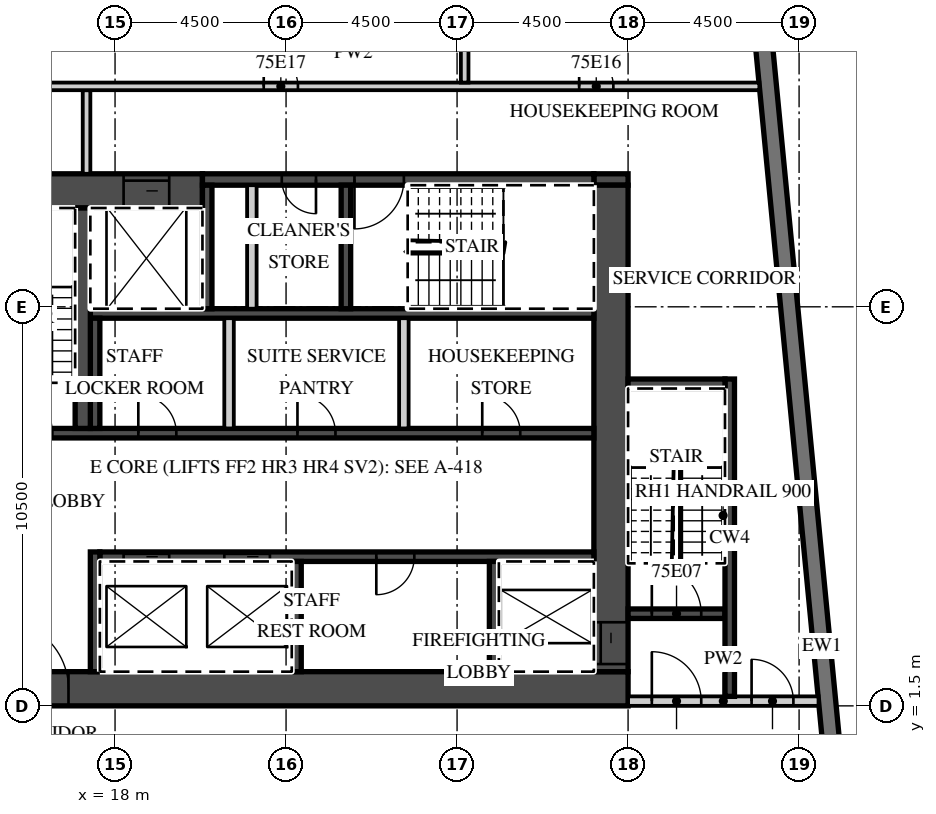
"""IFC4 building model, lengths in metres.
Left out: names, types, materials, properties, quantities, classifications, styles, units other than length and angle.
Written with IfcOpenShell. Run it as: python <this file> out.ifc"""

import sys

from ifc_helpers import new_model, si_unit, direction, frame, frame_2d, origin, place, context, subcontext, project, spatial, rectangle, extrude, element, fill, save


model = new_model("IFC4")
c1 = context("Model", 3, precision=1e-05, world=origin(), true_north=direction((0.0, 1.0)))
c2 = subcontext(c1, "Body", "Model", "MODEL_VIEW")
j1 = project(units=[si_unit("LENGTHUNIT", "METRE"), si_unit("PLANEANGLEUNIT", "RADIAN")], contexts=[c1])
p1 = place(None, origin())
s1 = spatial("IfcSite", under=j1, at=p1, CompositionType="ELEMENT")
p2 = place(p1, origin())
s2 = spatial("IfcBuilding", under=s1, at=p2, CompositionType="ELEMENT")
p3 = place(p2, frame((0.0, 0.0, 298.2)))
s3 = spatial("IfcBuildingStorey", under=s2, at=p3, CompositionType="ELEMENT", Elevation=298.2)
p4 = place(p3, frame((38.132, -12.858, 0.0), z_axis=(0.0, 0.0, 1.0), x_axis=(-0.095847749461, 0.995396006082, 0.0)))
e1 = element("IfcWall", 1, at=p4, inside=s3, PredefinedType="SOLIDWALL", context=c2, shape_type="SweptSolid", body=[
    extrude(rectangle(XDim=32.0, YDim=0.45, at=frame_2d((16.0, 0.0))), origin(), (0.0, 0.0, 1.0), 3.02),
])
p5 = place(p3, frame((13.5, 1.95, 0.0), z_axis=(0.0, 0.0, 1.0), x_axis=(1.0, 0.0, 0.0)))
e2 = element("IfcWall", 2, at=p5, inside=s3, PredefinedType="SHEAR", context=c2, shape_type="SweptSolid", body=[
    extrude(rectangle(XDim=18.0, YDim=0.9, at=frame_2d((9.0, 0.0))), origin(), (0.0, 0.0, 1.0), 3.02),
])
p6 = place(p5, frame((1.475, 0.0, 0.0)))
e3 = element("IfcOpeningElement", 3, at=p6, cuts=e2, PredefinedType="OPENING", context=c2, shape_type="SweptSolid", body=[
    extrude(rectangle(XDim=1.8, YDim=2.1, at=frame_2d((0.9, 1.05))), frame((0.0, 0.46, 0.0), z_axis=(0.0, -1.0, 0.0), x_axis=(1.0, 0.0, 0.0)), (0.0, 0.0, 1.0), 0.92),
])
p7 = place(p3, frame((13.5, 15.05, 0.0), z_axis=(0.0, 0.0, 1.0), x_axis=(1.0, 0.0, 0.0)))
e4 = element("IfcWall", 4, at=p7, inside=s3, PredefinedType="SHEAR", context=c2, shape_type="SweptSolid", body=[
    extrude(rectangle(XDim=6.8, YDim=0.9, at=frame_2d((3.4, 0.0))), origin(), (0.0, 0.0, 1.0), 3.02),
])
p8 = place(p7, frame((4.725, 0.0, 0.0)))
e5 = element("IfcOpeningElement", 5, at=p8, cuts=e4, PredefinedType="OPENING", context=c2, shape_type="SweptSolid", body=[
    extrude(rectangle(XDim=1.2, YDim=2.1, at=frame_2d((0.6, 1.05))), frame((0.0, 0.46, 0.0), z_axis=(0.0, -1.0, 0.0), x_axis=(1.0, 0.0, 0.0)), (0.0, 0.0, 1.0), 0.92),
])
p9 = place(p3, frame((30.6, 15.35, 0.0), z_axis=(0.0, 0.0, 1.0), x_axis=(1.0, 0.0, 0.0)))
e6 = element("IfcWall", 6, at=p9, inside=s3, PredefinedType="SHEAR", context=c2, shape_type="SweptSolid", body=[
    extrude(rectangle(XDim=0.9, YDim=0.3, at=frame_2d((0.45, 0.0))), origin(), (0.0, 0.0, 1.0), 3.02),
])
p10 = place(p3, frame((20.3, 15.35, 0.0), z_axis=(0.0, 0.0, 1.0), x_axis=(1.0, 0.0, 0.0)))
e7 = element("IfcWall", 7, at=p10, inside=s3, PredefinedType="SHEAR", context=c2, shape_type="SweptSolid", body=[
    extrude(rectangle(XDim=10.3, YDim=0.3, at=frame_2d((5.15, 0.0))), origin(), (0.0, 0.0, 1.0), 3.02),
])
p11 = place(p10, frame((4.0, 0.0, 0.0)))
e8 = element("IfcOpeningElement", 8, at=p11, cuts=e7, PredefinedType="OPENING", context=c2, shape_type="SweptSolid", body=[
    extrude(rectangle(XDim=1.3, YDim=2.1, at=frame_2d((0.65, 1.05))), frame((0.0, 0.16, 0.0), z_axis=(0.0, -1.0, 0.0), x_axis=(1.0, 0.0, 0.0)), (0.0, 0.0, 1.0), 0.32),
])
p12 = place(p10, frame((2.087, 0.0, 0.0)))
e9 = element("IfcOpeningElement", 9, at=p12, cuts=e7, PredefinedType="OPENING", context=c2, shape_type="SweptSolid", body=[
    extrude(rectangle(XDim=0.9, YDim=2.1, at=frame_2d((0.45, 1.05))), frame((0.0, 0.16, 0.0), z_axis=(0.0, -1.0, 0.0), x_axis=(1.0, 0.0, 0.0)), (0.0, 0.0, 1.0), 0.32),
])
p13 = place(p3, frame((31.05, 2.4, 0.0), z_axis=(0.0, 0.0, 1.0), x_axis=(0.0, 1.0, 0.0)))
e10 = element("IfcWall", 10, at=p13, inside=s3, PredefinedType="SHEAR", context=c2, shape_type="SweptSolid", body=[
    extrude(rectangle(XDim=12.8, YDim=0.9, at=frame_2d((6.4, 0.0))), origin(), (0.0, 0.0, 1.0), 3.02),
])
p14 = place(p13, frame((0.2, 0.0, 0.0)))
e11 = element("IfcOpeningElement", 11, at=p14, cuts=e10, PredefinedType="OPENING", context=c2, shape_type="SweptSolid", body=[
    extrude(rectangle(XDim=1.1, YDim=2.1, at=frame_2d((0.55, 1.05))), frame((0.0, 0.46, 0.0), z_axis=(0.0, -1.0, 0.0), x_axis=(1.0, 0.0, 0.0)), (0.0, 0.0, 1.0), 0.92),
])
p15 = place(p3, frame((17.6, 5.425, 0.0), z_axis=(0.0, 0.0, 1.0), x_axis=(1.0, 0.0, 0.0)))
e12 = element("IfcWall", 12, at=p15, inside=s3, PredefinedType="SHEAR", context=c2, shape_type="SweptSolid", body=[
    extrude(rectangle(XDim=13.0, YDim=0.25, at=frame_2d((6.5, 0.0))), origin(), (0.0, 0.0, 1.0), 3.02),
])
p16 = place(p15, frame((3.275, 0.0, 0.0)))
e13 = element("IfcOpeningElement", 13, at=p16, cuts=e12, PredefinedType="OPENING", context=c2, shape_type="SweptSolid", body=[
    extrude(rectangle(XDim=1.2, YDim=2.1, at=frame_2d((0.6, 1.05))), frame((0.0, 0.135, 0.0), z_axis=(0.0, -1.0, 0.0), x_axis=(1.0, 0.0, 0.0)), (0.0, 0.0, 1.0), 0.27),
])
p17 = place(p15, frame((0.625, 0.0, 0.0)))
e14 = element("IfcOpeningElement", 14, at=p17, cuts=e12, PredefinedType="OPENING", context=c2, shape_type="SweptSolid", body=[
    extrude(rectangle(XDim=1.2, YDim=2.1, at=frame_2d((0.6, 1.05))), frame((0.0, 0.135, 0.0), z_axis=(0.0, -1.0, 0.0), x_axis=(1.0, 0.0, 0.0)), (0.0, 0.0, 1.0), 0.27),
])
p18 = place(p15, frame((7.275, 0.0, 0.0)))
e15 = element("IfcOpeningElement", 15, at=p18, cuts=e12, PredefinedType="OPENING", context=c2, shape_type="SweptSolid", body=[
    extrude(rectangle(XDim=1.0, YDim=2.1, at=frame_2d((0.5, 1.05))), frame((0.0, 0.135, 0.0), z_axis=(0.0, -1.0, 0.0), x_axis=(1.0, 0.0, 0.0)), (0.0, 0.0, 1.0), 0.27),
])
p19 = place(p3, frame((17.475, 2.4, 0.0), z_axis=(0.0, 0.0, 1.0), x_axis=(0.0, 1.0, 0.0)))
e16 = element("IfcWall", 16, at=p19, inside=s3, PredefinedType="SHEAR", context=c2, shape_type="SweptSolid", body=[
    extrude(rectangle(XDim=3.15, YDim=0.25, at=frame_2d((1.575, 0.0))), origin(), (0.0, 0.0, 1.0), 3.02),
])
for number, where, z_axis, x_axis in (
    (17, (27.975, 2.4, 0.0), (0.0, 0.0, 1.0), (0.0, 1.0, 0.0)),
    (18, (22.775, 2.4, 0.0), (0.0, 0.0, 1.0), (0.0, 1.0, 0.0)),
):
    element("IfcWall", number, at=place(p3, frame(where, z_axis=z_axis, x_axis=x_axis)), inside=s3, PredefinedType="SHEAR", context=c2, shape_type="SweptSolid", body=[
        extrude(rectangle(XDim=2.9, YDim=0.25, at=frame_2d((1.45, 0.0))), origin(), (0.0, 0.0, 1.0), 3.02),
    ])
p20 = place(p3, frame((14.4, 8.675, 0.0), z_axis=(0.0, 0.0, 1.0), x_axis=(1.0, 0.0, 0.0)))
e19 = element("IfcWall", 19, at=p20, inside=s3, PredefinedType="SHEAR", context=c2, shape_type="SweptSolid", body=[
    extrude(rectangle(XDim=16.2, YDim=0.25, at=frame_2d((8.1, 0.0))), origin(), (0.0, 0.0, 1.0), 3.02),
])
p21 = place(p20, frame((0.65, 0.0, 0.0)))
e20 = element("IfcOpeningElement", 20, at=p21, cuts=e19, PredefinedType="OPENING", context=c2, shape_type="SweptSolid", body=[
    extrude(rectangle(XDim=1.3, YDim=2.1, at=frame_2d((0.65, 1.05))), frame((0.0, 0.135, 0.0), z_axis=(0.0, -1.0, 0.0), x_axis=(1.0, 0.0, 0.0)), (0.0, 0.0, 1.0), 0.27),
])
p22 = place(p20, frame((13.262, 0.0, 0.0)))
e21 = element("IfcOpeningElement", 21, at=p22, cuts=e19, PredefinedType="OPENING", context=c2, shape_type="SweptSolid", body=[
    extrude(rectangle(XDim=1.0, YDim=2.1, at=frame_2d((0.5, 1.05))), frame((0.0, 0.135, 0.0), z_axis=(0.0, -1.0, 0.0), x_axis=(1.0, 0.0, 0.0)), (0.0, 0.0, 1.0), 0.27),
])
p23 = place(p20, frame((8.4, 0.0, 0.0)))
e22 = element("IfcOpeningElement", 22, at=p23, cuts=e19, PredefinedType="OPENING", context=c2, shape_type="SweptSolid", body=[
    extrude(rectangle(XDim=1.0, YDim=2.1, at=frame_2d((0.5, 1.05))), frame((0.0, 0.135, 0.0), z_axis=(0.0, -1.0, 0.0), x_axis=(1.0, 0.0, 0.0)), (0.0, 0.0, 1.0), 0.27),
])
p24 = place(p20, frame((4.212, 0.0, 0.0)))
e23 = element("IfcOpeningElement", 23, at=p24, cuts=e19, PredefinedType="OPENING", context=c2, shape_type="SweptSolid", body=[
    extrude(rectangle(XDim=1.0, YDim=2.1, at=frame_2d((0.5, 1.05))), frame((0.0, 0.135, 0.0), z_axis=(0.0, -1.0, 0.0), x_axis=(1.0, 0.0, 0.0)), (0.0, 0.0, 1.0), 0.27),
])
p25 = place(p3, frame((17.35, 11.825, 0.0), z_axis=(0.0, 0.0, 1.0), x_axis=(1.0, 0.0, 0.0)))
e24 = element("IfcWall", 24, at=p25, inside=s3, PredefinedType="SHEAR", context=c2, shape_type="SweptSolid", body=[
    extrude(rectangle(XDim=13.25, YDim=0.25, at=frame_2d((6.625, 0.0))), origin(), (0.0, 0.0, 1.0), 3.02),
])
p26 = place(p3, frame((17.475, 8.8, 0.0), z_axis=(0.0, 0.0, 1.0), x_axis=(0.0, 1.0, 0.0)))
e25 = element("IfcWall", 25, at=p26, inside=s3, PredefinedType="SHEAR", context=c2, shape_type="SweptSolid", body=[
    extrude(rectangle(XDim=2.9, YDim=0.25, at=frame_2d((1.45, 0.0))), origin(), (0.0, 0.0, 1.0), 3.02),
])
for number, where, z_axis, x_axis in (
    (26, (25.6, 8.8, 0.0), (0.0, 0.0, 1.0), (0.0, 1.0, 0.0)),
    (27, (21.0, 8.8, 0.0), (0.0, 0.0, 1.0), (0.0, 1.0, 0.0)),
):
    element("IfcWall", number, at=place(p3, frame(where, z_axis=z_axis, x_axis=x_axis)), inside=s3, PredefinedType="PARTITIONING", context=c2, shape_type="SweptSolid", body=[
        extrude(rectangle(XDim=2.9, YDim=0.25, at=frame_2d((1.45, 0.0))), origin(), (0.0, 0.0, 1.0), 3.02),
    ])
p27 = place(p3, frame((17.15, 8.8, 0.0), z_axis=(0.0, 0.0, 1.0), x_axis=(0.0, 1.0, 0.0)))
e28 = element("IfcWall", 28, at=p27, inside=s3, PredefinedType="SHEAR", context=c2, shape_type="SweptSolid", body=[
    extrude(rectangle(XDim=5.8, YDim=0.4, at=frame_2d((2.9, 0.0))), origin(), (0.0, 0.0, 1.0), 3.02),
])
for number, where, z_axis, x_axis in (
    (29, (20.425, 11.95, 0.0), (0.0, 0.0, 1.0), (0.0, 1.0, 0.0)),
    (30, (24.075, 11.95, 0.0), (0.0, 0.0, 1.0), (0.0, 1.0, 0.0)),
):
    element("IfcWall", number, at=place(p3, frame(where, z_axis=z_axis, x_axis=x_axis)), inside=s3, PredefinedType="SHEAR", context=c2, shape_type="SweptSolid", body=[
        extrude(rectangle(XDim=3.25, YDim=0.25, at=frame_2d((1.625, 0.0))), origin(), (0.0, 0.0, 1.0), 3.02),
    ])
p28 = place(p3, frame((21.6, 11.95, 0.0), z_axis=(0.0, 0.0, 1.0), x_axis=(0.0, 1.0, 0.0)))
e31 = element("IfcWall", 31, at=p28, inside=s3, PredefinedType="PARTITIONING", context=c2, shape_type="SweptSolid", body=[
    extrude(rectangle(XDim=3.25, YDim=0.25, at=frame_2d((1.625, 0.0))), origin(), (0.0, 0.0, 1.0), 3.02),
])
p29 = place(p3, frame((31.5, 1.625, 0.0), z_axis=(0.0, 0.0, 1.0), x_axis=(1.0, 0.0, 0.0)))
e32 = element("IfcWall", 32, at=p29, inside=s3, PredefinedType="PARTITIONING", context=c2, shape_type="SweptSolid", body=[
    extrude(rectangle(XDim=5.012, YDim=0.25, at=frame_2d((2.506, 0.0))), origin(), (0.0, 0.0, 1.0), 3.02),
])
p30 = place(p29, frame((0.625, 0.0, 0.0)))
e33 = element("IfcOpeningElement", 33, at=p30, cuts=e32, PredefinedType="OPENING", context=c2, shape_type="SweptSolid", body=[
    extrude(rectangle(XDim=1.3, YDim=2.1, at=frame_2d((0.65, 1.05))), frame((0.0, 0.135, 0.0), z_axis=(0.0, -1.0, 0.0), x_axis=(1.0, 0.0, 0.0)), (0.0, 0.0, 1.0), 0.27),
])
p31 = place(p29, frame((3.25, 0.0, 0.0)))
e34 = element("IfcOpeningElement", 34, at=p31, cuts=e32, PredefinedType="OPENING", context=c2, shape_type="SweptSolid", body=[
    extrude(rectangle(XDim=1.1, YDim=2.1, at=frame_2d((0.55, 1.05))), frame((0.0, 0.135, 0.0), z_axis=(0.0, -1.0, 0.0), x_axis=(1.0, 0.0, 0.0)), (0.0, 0.0, 1.0), 0.27),
])
p32 = place(p3, frame((31.5, 3.925, 0.0), z_axis=(0.0, 0.0, 1.0), x_axis=(1.0, 0.0, 0.0)))
e35 = element("IfcWall", 35, at=p32, inside=s3, PredefinedType="SHEAR", context=c2, shape_type="SweptSolid", body=[
    extrude(rectangle(XDim=2.55, YDim=0.25, at=frame_2d((1.275, 0.0))), origin(), (0.0, 0.0, 1.0), 3.02),
])
p33 = place(p32, frame((0.625, 0.0, 0.0)))
e36 = element("IfcOpeningElement", 36, at=p33, cuts=e35, PredefinedType="OPENING", context=c2, shape_type="SweptSolid", body=[
    extrude(rectangle(XDim=1.3, YDim=2.1, at=frame_2d((0.65, 1.05))), frame((0.0, 0.135, 0.0), z_axis=(0.0, -1.0, 0.0), x_axis=(1.0, 0.0, 0.0)), (0.0, 0.0, 1.0), 0.27),
])
p34 = place(p3, frame((34.175, 1.75, 0.0), z_axis=(0.0, 0.0, 1.0), x_axis=(0.0, 1.0, 0.0)))
e37 = element("IfcWall", 37, at=p34, inside=s3, PredefinedType="SHEAR", context=c2, shape_type="SweptSolid", body=[
    extrude(rectangle(XDim=8.35, YDim=0.25, at=frame_2d((4.175, 0.0))), origin(), (0.0, 0.0, 1.0), 3.02),
])
p35 = place(p3, frame((31.5, 9.975, 0.0), z_axis=(0.0, 0.0, 1.0), x_axis=(1.0, 0.0, 0.0)))
e38 = element("IfcWall", 38, at=p35, inside=s3, PredefinedType="SHEAR", context=c2, shape_type="SweptSolid", body=[
    extrude(rectangle(XDim=2.55, YDim=0.25, at=frame_2d((1.275, 0.0))), origin(), (0.0, 0.0, 1.0), 3.02),
])
p36 = place(p3, frame((17.25, 15.5, 0.0), z_axis=(0.0, 0.0, 1.0), x_axis=(0.0, 1.0, 0.0)))
e39 = element("IfcWall", 39, at=p36, inside=s3, PredefinedType="PARTITIONING", context=c2, shape_type="SweptSolid", body=[
    extrude(rectangle(XDim=2.2, YDim=0.2, at=frame_2d((1.1, 0.0))), origin(), (0.0, 0.0, 1.0), 3.02),
])
p37 = place(p3, frame((13.6, 17.8, 0.0), z_axis=(0.0, 0.0, 1.0), x_axis=(1.0, 0.0, 0.0)))
e40 = element("IfcWall", 40, at=p37, inside=s3, PredefinedType="PARTITIONING", context=c2, shape_type="SweptSolid", body=[
    extrude(rectangle(XDim=21.354, YDim=0.2, at=frame_2d((10.677, 0.0))), origin(), (0.0, 0.0, 1.0), 3.02),
])
p38 = place(p37, frame((16.613, 0.0, 0.0)))
e41 = element("IfcOpeningElement", 41, at=p38, cuts=e40, PredefinedType="OPENING", context=c2, shape_type="SweptSolid", body=[
    extrude(rectangle(XDim=0.9, YDim=2.1, at=frame_2d((0.45, 1.05))), frame((0.0, 0.11, 0.0), z_axis=(0.0, -1.0, 0.0), x_axis=(1.0, 0.0, 0.0)), (0.0, 0.0, 1.0), 0.22),
])
p39 = place(p37, frame((8.312, 0.0, 0.0)))
e42 = element("IfcOpeningElement", 42, at=p39, cuts=e40, PredefinedType="OPENING", context=c2, shape_type="SweptSolid", body=[
    extrude(rectangle(XDim=0.9, YDim=2.1, at=frame_2d((0.45, 1.05))), frame((0.0, 0.11, 0.0), z_axis=(0.0, -1.0, 0.0), x_axis=(1.0, 0.0, 0.0)), (0.0, 0.0, 1.0), 0.22),
])
p40 = place(p3, frame((27.2, 17.9, 0.0), z_axis=(0.0, 0.0, 1.0), x_axis=(0.0, 1.0, 0.0)))
e43 = element("IfcWall", 43, at=p40, inside=s3, PredefinedType="PARTITIONING", context=c2, shape_type="SweptSolid", body=[
    extrude(rectangle(XDim=3.905, YDim=0.2, at=frame_2d((1.953, 0.0))), origin(), (0.0, 0.0, 1.0), 3.02),
])
p41 = place(p16, origin())
e44 = element("IfcDoor", 44, at=p41, inside=s3, OperationType="SLIDING_TO_RIGHT", PredefinedType="DOOR", context=c2, shape_type="SweptSolid", body=[
    extrude(rectangle(XDim=1.2, YDim=2.1, at=frame_2d((0.6, 1.05))), frame((0.0, 0.025, 0.0), z_axis=(0.0, -1.0, 0.0), x_axis=(1.0, 0.0, 0.0)), (0.0, 0.0, 1.0), 0.05),
])
fill(e13, e44)
p42 = place(p17, origin())
e45 = element("IfcDoor", 45, at=p42, inside=s3, OperationType="SLIDING_TO_LEFT", PredefinedType="DOOR", context=c2, shape_type="SweptSolid", body=[
    extrude(rectangle(XDim=1.2, YDim=2.1, at=frame_2d((0.6, 1.05))), frame((0.0, 0.025, 0.0), z_axis=(0.0, -1.0, 0.0), x_axis=(1.0, 0.0, 0.0)), (0.0, 0.0, 1.0), 0.05),
])
fill(e14, e45)
p43 = place(p8, origin())
e46 = element("IfcDoor", 46, at=p43, inside=s3, OperationType="SLIDING_TO_LEFT", PredefinedType="DOOR", context=c2, shape_type="SweptSolid", body=[
    extrude(rectangle(XDim=1.2, YDim=2.1, at=frame_2d((0.6, 1.05))), frame((0.0, 0.025, 0.0), z_axis=(0.0, -1.0, 0.0), x_axis=(1.0, 0.0, 0.0)), (0.0, 0.0, 1.0), 0.05),
])
fill(e5, e46)
p44 = place(p14, origin())
e47 = element("IfcDoor", 47, at=p44, inside=s3, OperationType="SLIDING_TO_LEFT", PredefinedType="DOOR", context=c2, shape_type="SweptSolid", body=[
    extrude(rectangle(XDim=1.1, YDim=2.1, at=frame_2d((0.55, 1.05))), frame((0.0, 0.025, 0.0), z_axis=(0.0, -1.0, 0.0), x_axis=(1.0, 0.0, 0.0)), (0.0, 0.0, 1.0), 0.05),
])
fill(e11, e47)
p45 = place(p6, origin())
e48 = element("IfcDoor", 48, at=p45, inside=s3, OperationType="DOUBLE_DOOR_DOUBLE_SWING", PredefinedType="DOOR", context=c2, shape_type="SweptSolid", body=[
    extrude(rectangle(XDim=1.8, YDim=2.1, at=frame_2d((0.9, 1.05))), frame((0.0, 0.025, 0.0), z_axis=(0.0, -1.0, 0.0), x_axis=(1.0, 0.0, 0.0)), (0.0, 0.0, 1.0), 0.05),
])
fill(e3, e48)
p46 = place(p30, origin())
e49 = element("IfcDoor", 49, at=p46, inside=s3, OperationType="SINGLE_SWING_LEFT", PredefinedType="DOOR", context=c2, shape_type="SweptSolid", body=[
    extrude(rectangle(XDim=1.3, YDim=2.1, at=frame_2d((0.65, 1.05))), frame((0.0, 0.025, 0.0), z_axis=(0.0, -1.0, 0.0), x_axis=(1.0, 0.0, 0.0)), (0.0, 0.0, 1.0), 0.05),
])
fill(e33, e49)
p47 = place(p33, origin())
e50 = element("IfcDoor", 50, at=p47, inside=s3, OperationType="SINGLE_SWING_LEFT", PredefinedType="DOOR", context=c2, shape_type="SweptSolid", body=[
    extrude(rectangle(XDim=1.3, YDim=2.1, at=frame_2d((0.65, 1.05))), frame((0.0, 0.025, 0.0), z_axis=(0.0, -1.0, 0.0), x_axis=(1.0, 0.0, 0.0)), (0.0, 0.0, 1.0), 0.05),
])
fill(e36, e50)
p48 = place(p31, origin())
e51 = element("IfcDoor", 51, at=p48, inside=s3, OperationType="SINGLE_SWING_LEFT", PredefinedType="DOOR", context=c2, shape_type="SweptSolid", body=[
    extrude(rectangle(XDim=1.1, YDim=2.1, at=frame_2d((0.55, 1.05))), frame((0.0, 0.025, 0.0), z_axis=(0.0, -1.0, 0.0), x_axis=(1.0, 0.0, 0.0)), (0.0, 0.0, 1.0), 0.05),
])
fill(e34, e51)
p49 = place(p11, origin())
e52 = element("IfcDoor", 52, at=p49, inside=s3, OperationType="SINGLE_SWING_LEFT", PredefinedType="DOOR", context=c2, shape_type="SweptSolid", body=[
    extrude(rectangle(XDim=1.3, YDim=2.1, at=frame_2d((0.65, 1.05))), frame((0.0, 0.025, 0.0), z_axis=(0.0, -1.0, 0.0), x_axis=(1.0, 0.0, 0.0)), (0.0, 0.0, 1.0), 0.05),
])
fill(e8, e52)
p50 = place(p12, origin())
e53 = element("IfcDoor", 53, at=p50, inside=s3, OperationType="SINGLE_SWING_RIGHT", PredefinedType="DOOR", context=c2, shape_type="SweptSolid", body=[
    extrude(rectangle(XDim=0.9, YDim=2.1, at=frame_2d((0.45, 1.05))), frame((0.0, 0.025, 0.0), z_axis=(0.0, -1.0, 0.0), x_axis=(1.0, 0.0, 0.0)), (0.0, 0.0, 1.0), 0.05),
])
fill(e9, e53)
p51 = place(p22, origin())
e54 = element("IfcDoor", 54, at=p51, inside=s3, OperationType="SINGLE_SWING_LEFT", PredefinedType="DOOR", context=c2, shape_type="SweptSolid", body=[
    extrude(rectangle(XDim=1.0, YDim=2.1, at=frame_2d((0.5, 1.05))), frame((0.0, 0.025, 0.0), z_axis=(0.0, -1.0, 0.0), x_axis=(1.0, 0.0, 0.0)), (0.0, 0.0, 1.0), 0.05),
])
fill(e21, e54)
p52 = place(p23, origin())
e55 = element("IfcDoor", 55, at=p52, inside=s3, OperationType="SINGLE_SWING_LEFT", PredefinedType="DOOR", context=c2, shape_type="SweptSolid", body=[
    extrude(rectangle(XDim=1.0, YDim=2.1, at=frame_2d((0.5, 1.05))), frame((0.0, 0.025, 0.0), z_axis=(0.0, -1.0, 0.0), x_axis=(1.0, 0.0, 0.0)), (0.0, 0.0, 1.0), 0.05),
])
fill(e22, e55)
p53 = place(p24, origin())
e56 = element("IfcDoor", 56, at=p53, inside=s3, OperationType="SINGLE_SWING_LEFT", PredefinedType="DOOR", context=c2, shape_type="SweptSolid", body=[
    extrude(rectangle(XDim=1.0, YDim=2.1, at=frame_2d((0.5, 1.05))), frame((0.0, 0.025, 0.0), z_axis=(0.0, -1.0, 0.0), x_axis=(1.0, 0.0, 0.0)), (0.0, 0.0, 1.0), 0.05),
])
fill(e23, e56)
p54 = place(p18, origin())
e57 = element("IfcDoor", 57, at=p54, inside=s3, OperationType="SINGLE_SWING_LEFT", PredefinedType="DOOR", context=c2, shape_type="SweptSolid", body=[
    extrude(rectangle(XDim=1.0, YDim=2.1, at=frame_2d((0.5, 1.05))), frame((0.0, 0.025, 0.0), z_axis=(0.0, -1.0, 0.0), x_axis=(1.0, 0.0, 0.0)), (0.0, 0.0, 1.0), 0.05),
])
fill(e15, e57)
p55 = place(p38, origin())
e58 = element("IfcDoor", 58, at=p55, inside=s3, OperationType="SINGLE_SWING_LEFT", PredefinedType="DOOR", context=c2, shape_type="SweptSolid", body=[
    extrude(rectangle(XDim=0.9, YDim=2.1, at=frame_2d((0.45, 1.05))), frame((0.0, 0.025, 0.0), z_axis=(0.0, -1.0, 0.0), x_axis=(1.0, 0.0, 0.0)), (0.0, 0.0, 1.0), 0.05),
])
fill(e41, e58)
p56 = place(p39, origin())
e59 = element("IfcDoor", 59, at=p56, inside=s3, OperationType="SINGLE_SWING_LEFT", PredefinedType="DOOR", context=c2, shape_type="SweptSolid", body=[
    extrude(rectangle(XDim=0.9, YDim=2.1, at=frame_2d((0.45, 1.05))), frame((0.0, 0.025, 0.0), z_axis=(0.0, -1.0, 0.0), x_axis=(1.0, 0.0, 0.0)), (0.0, 0.0, 1.0), 0.05),
])
fill(e42, e59)
save(model, sys.argv[1])
